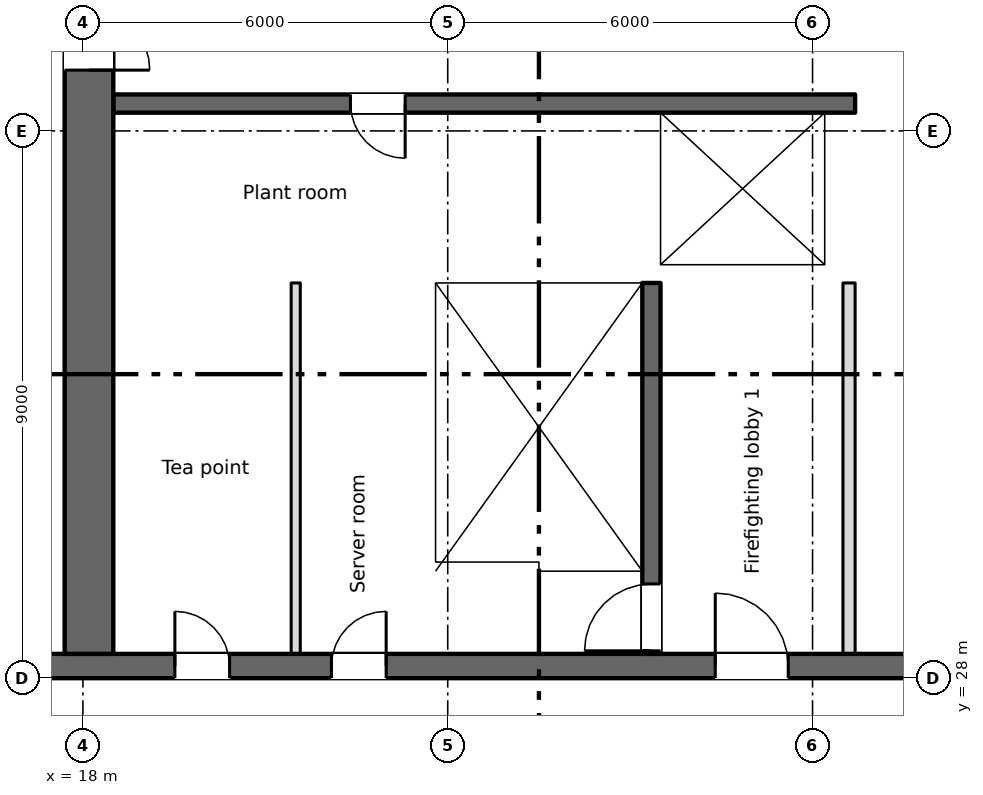
"""IFC4 building model, lengths in metres.
Left out: names, types, materials, properties, quantities, classifications, styles, units other than length and angle.
Written with IfcOpenShell. Run it as: python <this file> out.ifc"""

import sys

from ifc_helpers import new_model, si_unit, direction, frame, frame_2d, origin, place, context, subcontext, project, spatial, rectangle, extrude, element, fill, save


model = new_model("IFC4")
c1 = context("Model", 3, precision=1e-05, world=origin(), true_north=direction((0.0, 1.0)))
c2 = subcontext(c1, "Body", "Model", "MODEL_VIEW")
j1 = project(units=[si_unit("LENGTHUNIT", "METRE"), si_unit("PLANEANGLEUNIT", "RADIAN")], contexts=[c1])
p1 = place(None, origin())
s1 = spatial("IfcSite", under=j1, at=p1, CompositionType="ELEMENT")
p2 = place(p1, origin())
s2 = spatial("IfcBuilding", under=s1, at=p2, CompositionType="ELEMENT")
p3 = place(p2, frame((0.0, 0.0, 95.0)))
s3 = spatial("IfcBuildingStorey", under=s2, at=p3, CompositionType="ELEMENT", Elevation=95.0)
p4 = place(p3, frame((6.7, 28.2, 0.0), z_axis=(0.0, 0.0, 1.0), x_axis=(1.0, 0.0, 0.0)))
e1 = element("IfcWall", 1, at=p4, inside=s3, PredefinedType="SHEAR", context=c2, shape_type="SweptSolid", body=[
    extrude(rectangle(XDim=57.8, YDim=0.4, at=frame_2d((28.9, 0.0))), origin(), (0.0, 0.0, 1.0), 3.35),
])
p5 = place(p4, frame((12.812, 0.0, 0.0)))
e2 = element("IfcOpeningElement", 2, at=p5, cuts=e1, PredefinedType="OPENING", context=c2, shape_type="SweptSolid", body=[
    extrude(rectangle(XDim=0.9, YDim=2.1, at=frame_2d((0.45, 1.05))), frame((0.0, 0.21, 0.0), z_axis=(0.0, -1.0, 0.0), x_axis=(1.0, 0.0, 0.0)), (0.0, 0.0, 1.0), 0.42),
])
p6 = place(p4, frame((15.387, 0.0, 0.0)))
e3 = element("IfcOpeningElement", 3, at=p6, cuts=e1, PredefinedType="OPENING", context=c2, shape_type="SweptSolid", body=[
    extrude(rectangle(XDim=0.9, YDim=2.1, at=frame_2d((0.45, 1.05))), frame((0.0, 0.21, 0.0), z_axis=(0.0, -1.0, 0.0), x_axis=(1.0, 0.0, 0.0)), (0.0, 0.0, 1.0), 0.42),
])
p7 = place(p4, frame((48.312, 0.0, 0.0)))
e4 = element("IfcOpeningElement", 4, at=p7, cuts=e1, PredefinedType="OPENING", context=c2, shape_type="SweptSolid", body=[
    extrude(rectangle(XDim=0.9, YDim=2.1, at=frame_2d((0.45, 1.05))), frame((0.0, 0.21, 0.0), z_axis=(0.0, -1.0, 0.0), x_axis=(1.0, 0.0, 0.0)), (0.0, 0.0, 1.0), 0.42),
])
p8 = place(p4, frame((50.887, 0.0, 0.0)))
e5 = element("IfcOpeningElement", 5, at=p8, cuts=e1, PredefinedType="OPENING", context=c2, shape_type="SweptSolid", body=[
    extrude(rectangle(XDim=0.9, YDim=2.1, at=frame_2d((0.45, 1.05))), frame((0.0, 0.21, 0.0), z_axis=(0.0, -1.0, 0.0), x_axis=(1.0, 0.0, 0.0)), (0.0, 0.0, 1.0), 0.42),
])
p9 = place(p4, frame((0.562, 0.0, 0.0)))
e6 = element("IfcOpeningElement", 6, at=p9, cuts=e1, PredefinedType="OPENING", context=c2, shape_type="SweptSolid", body=[
    extrude(rectangle(XDim=0.9, YDim=2.1, at=frame_2d((0.45, 1.05))), frame((0.0, 0.21, 0.0), z_axis=(0.0, -1.0, 0.0), x_axis=(1.0, 0.0, 0.0)), (0.0, 0.0, 1.0), 0.42),
])
p10 = place(p4, frame((2.137, 0.0, 0.0)))
e7 = element("IfcOpeningElement", 7, at=p10, cuts=e1, PredefinedType="OPENING", context=c2, shape_type="SweptSolid", body=[
    extrude(rectangle(XDim=0.9, YDim=2.1, at=frame_2d((0.45, 1.05))), frame((0.0, 0.21, 0.0), z_axis=(0.0, -1.0, 0.0), x_axis=(1.0, 0.0, 0.0)), (0.0, 0.0, 1.0), 0.42),
])
p11 = place(p4, frame((4.7, 0.0, 0.0)))
e8 = element("IfcOpeningElement", 8, at=p11, cuts=e1, PredefinedType="OPENING", context=c2, shape_type="SweptSolid", body=[
    extrude(rectangle(XDim=1.2, YDim=2.1, at=frame_2d((0.6, 1.05))), frame((0.0, 0.21, 0.0), z_axis=(0.0, -1.0, 0.0), x_axis=(1.0, 0.0, 0.0)), (0.0, 0.0, 1.0), 0.42),
])
p12 = place(p4, frame((31.7, 0.0, 0.0)))
e9 = element("IfcOpeningElement", 9, at=p12, cuts=e1, PredefinedType="OPENING", context=c2, shape_type="SweptSolid", body=[
    extrude(rectangle(XDim=1.2, YDim=2.1, at=frame_2d((0.6, 1.05))), frame((0.0, 0.21, 0.0), z_axis=(0.0, -1.0, 0.0), x_axis=(1.0, 0.0, 0.0)), (0.0, 0.0, 1.0), 0.42),
])
p13 = place(p4, frame((55.2, 0.0, 0.0)))
e10 = element("IfcOpeningElement", 10, at=p13, cuts=e1, PredefinedType="OPENING", context=c2, shape_type="SweptSolid", body=[
    extrude(rectangle(XDim=1.2, YDim=2.1, at=frame_2d((0.6, 1.05))), frame((0.0, 0.21, 0.0), z_axis=(0.0, -1.0, 0.0), x_axis=(1.0, 0.0, 0.0)), (0.0, 0.0, 1.0), 0.42),
])
p14 = place(p4, frame((21.7, 0.0, 0.0)))
e11 = element("IfcOpeningElement", 11, at=p14, cuts=e1, PredefinedType="OPENING", context=c2, shape_type="SweptSolid", body=[
    extrude(rectangle(XDim=1.2, YDim=2.1, at=frame_2d((0.6, 1.05))), frame((0.0, 0.21, 0.0), z_axis=(0.0, -1.0, 0.0), x_axis=(1.0, 0.0, 0.0)), (0.0, 0.0, 1.0), 0.42),
])
p15 = place(p4, frame((41.7, 0.0, 0.0)))
e12 = element("IfcOpeningElement", 12, at=p15, cuts=e1, PredefinedType="OPENING", context=c2, shape_type="SweptSolid", body=[
    extrude(rectangle(XDim=1.2, YDim=2.1, at=frame_2d((0.6, 1.05))), frame((0.0, 0.21, 0.0), z_axis=(0.0, -1.0, 0.0), x_axis=(1.0, 0.0, 0.0)), (0.0, 0.0, 1.0), 0.42),
])
p16 = place(p4, frame((24.85, 0.0, 0.0)))
e13 = element("IfcOpeningElement", 13, at=p16, cuts=e1, PredefinedType="OPENING", context=c2, shape_type="SweptSolid", body=[
    extrude(rectangle(XDim=2.4, YDim=2.1, at=frame_2d((1.2, 1.05))), frame((0.0, 0.21, 0.0), z_axis=(0.0, -1.0, 0.0), x_axis=(1.0, 0.0, 0.0)), (0.0, 0.0, 1.0), 0.42),
])
p17 = place(p4, frame((37.35, 0.0, 0.0)))
e14 = element("IfcOpeningElement", 14, at=p17, cuts=e1, PredefinedType="OPENING", context=c2, shape_type="SweptSolid", body=[
    extrude(rectangle(XDim=2.4, YDim=2.1, at=frame_2d((1.2, 1.05))), frame((0.0, 0.21, 0.0), z_axis=(0.0, -1.0, 0.0), x_axis=(1.0, 0.0, 0.0)), (0.0, 0.0, 1.0), 0.42),
])
p18 = place(p4, frame((7.95, 0.0, 0.0)))
e15 = element("IfcOpeningElement", 15, at=p18, cuts=e1, PredefinedType="OPENING", context=c2, shape_type="SweptSolid", body=[
    extrude(rectangle(XDim=2.4, YDim=2.1, at=frame_2d((1.2, 1.05))), frame((0.0, 0.21, 0.0), z_axis=(0.0, -1.0, 0.0), x_axis=(1.0, 0.0, 0.0)), (0.0, 0.0, 1.0), 0.42),
])
p19 = place(p4, frame((28.85, 0.0, 0.0)))
e16 = element("IfcOpeningElement", 16, at=p19, cuts=e1, PredefinedType="OPENING", context=c2, shape_type="SweptSolid", body=[
    extrude(rectangle(XDim=0.9, YDim=2.1, at=frame_2d((0.45, 1.05))), frame((0.0, 0.21, 0.0), z_axis=(0.0, -1.0, 0.0), x_axis=(1.0, 0.0, 0.0)), (0.0, 0.0, 1.0), 0.42),
])
p20 = place(p4, frame((34.85, 0.0, 0.0)))
e17 = element("IfcOpeningElement", 17, at=p20, cuts=e1, PredefinedType="OPENING", context=c2, shape_type="SweptSolid", body=[
    extrude(rectangle(XDim=0.9, YDim=2.1, at=frame_2d((0.45, 1.05))), frame((0.0, 0.21, 0.0), z_axis=(0.0, -1.0, 0.0), x_axis=(1.0, 0.0, 0.0)), (0.0, 0.0, 1.0), 0.42),
])
p21 = place(p3, frame((18.1, 28.4, 0.0), z_axis=(0.0, 0.0, 1.0), x_axis=(0.0, 1.0, 0.0)))
e18 = element("IfcWall", 18, at=p21, inside=s3, PredefinedType="SHEAR", context=c2, shape_type="SweptSolid", body=[
    extrude(rectangle(XDim=16.8, YDim=0.8, at=frame_2d((8.4, 0.0))), origin(), (0.0, 0.0, 1.0), 3.35),
])
p22 = place(p21, frame((9.6, 0.0, 0.0)))
e19 = element("IfcOpeningElement", 19, at=p22, cuts=e18, PredefinedType="OPENING", context=c2, shape_type="SweptSolid", body=[
    extrude(rectangle(XDim=2.0, YDim=2.1, at=frame_2d((1.0, 1.05))), frame((0.0, 0.41, 0.0), z_axis=(0.0, -1.0, 0.0), x_axis=(1.0, 0.0, 0.0)), (0.0, 0.0, 1.0), 0.82),
])
p23 = place(p21, frame((15.35, 0.0, 0.0)))
e20 = element("IfcOpeningElement", 20, at=p23, cuts=e18, PredefinedType="OPENING", context=c2, shape_type="SweptSolid", body=[
    extrude(rectangle(XDim=1.2, YDim=2.1, at=frame_2d((0.6, 1.05))), frame((0.0, 0.41, 0.0), z_axis=(0.0, -1.0, 0.0), x_axis=(1.0, 0.0, 0.0)), (0.0, 0.0, 1.0), 0.82),
])
p24 = place(p3, frame((23.65, 28.4, 0.0), z_axis=(0.0, 0.0, 1.0), x_axis=(0.0, 1.0, 0.0)))
e21 = element("IfcWall", 21, at=p24, inside=s3, PredefinedType="SHEAR", context=c2, shape_type="SweptSolid", body=[
    extrude(rectangle(XDim=6.1, YDim=0.3, at=frame_2d((3.05, 0.0))), origin(), (0.0, 0.0, 1.0), 3.35),
])
p25 = place(p3, frame((27.35, 28.4, 0.0), z_axis=(0.0, 0.0, 1.0), x_axis=(0.0, 1.0, 0.0)))
e22 = element("IfcWall", 22, at=p25, inside=s3, PredefinedType="SHEAR", context=c2, shape_type="SweptSolid", body=[
    extrude(rectangle(XDim=6.1, YDim=0.3, at=frame_2d((3.05, 0.0))), origin(), (0.0, 0.0, 1.0), 3.35),
])
p26 = place(p25, frame((0.05, 0.0, 0.0)))
e23 = element("IfcOpeningElement", 23, at=p26, cuts=e22, PredefinedType="OPENING", context=c2, shape_type="SweptSolid", body=[
    extrude(rectangle(XDim=1.1, YDim=2.1, at=frame_2d((0.55, 1.05))), frame((0.0, 0.16, 0.0), z_axis=(0.0, -1.0, 0.0), x_axis=(1.0, 0.0, 0.0)), (0.0, 0.0, 1.0), 0.32),
])
p27 = place(p3, frame((18.5, 34.65, 0.0), z_axis=(0.0, 0.0, 1.0), x_axis=(1.0, 0.0, 0.0)))
e24 = element("IfcWall", 24, at=p27, inside=s3, PredefinedType="SHEAR", context=c2, shape_type="SweptSolid", body=[
    extrude(rectangle(XDim=12.2, YDim=0.3, at=frame_2d((6.1, 0.0))), origin(), (0.0, 0.0, 1.0), 3.35),
])
p28 = place(p27, frame((9.8, 0.0, 0.0)))
e25 = element("IfcOpeningElement", 25, at=p28, cuts=e24, PredefinedType="OPENING", context=c2, shape_type="SweptSolid", body=[
    extrude(rectangle(XDim=1.1, YDim=2.1, at=frame_2d((0.55, 1.05))), frame((0.0, 0.16, 0.0), z_axis=(0.0, -1.0, 0.0), x_axis=(1.0, 0.0, 0.0)), (0.0, 0.0, 1.0), 0.32),
])
p29 = place(p3, frame((30.7, 37.45, 0.0), z_axis=(0.0, 0.0, 1.0), x_axis=(-1.0, 0.0, 0.0)))
e26 = element("IfcWall", 26, at=p29, inside=s3, PredefinedType="SHEAR", context=c2, shape_type="SweptSolid", body=[
    extrude(rectangle(XDim=12.2, YDim=0.3, at=frame_2d((6.1, 0.0))), origin(), (0.0, 0.0, 1.0), 3.35),
])
p30 = place(p29, frame((7.4, 0.0, 0.0)))
e27 = element("IfcOpeningElement", 27, at=p30, cuts=e26, PredefinedType="OPENING", context=c2, shape_type="SweptSolid", body=[
    extrude(rectangle(XDim=0.9, YDim=2.1, at=frame_2d((0.45, 1.05))), frame((0.0, 0.16, 0.0), z_axis=(0.0, -1.0, 0.0), x_axis=(1.0, 0.0, 0.0)), (0.0, 0.0, 1.0), 0.32),
])
p31 = place(p3, frame((27.35, 34.8, 0.0), z_axis=(0.0, 0.0, 1.0), x_axis=(0.0, 1.0, 0.0)))
e28 = element("IfcWall", 28, at=p31, inside=s3, PredefinedType="SHEAR", context=c2, shape_type="SweptSolid", body=[
    extrude(rectangle(XDim=2.5, YDim=0.3, at=frame_2d((1.25, 0.0))), origin(), (0.0, 0.0, 1.0), 3.35),
])
p32 = place(p3, frame((30.45, 34.8, 0.0), z_axis=(0.0, 0.0, 1.0), x_axis=(0.0, 1.0, 0.0)))
e29 = element("IfcWall", 29, at=p32, inside=s3, PredefinedType="SHEAR", context=c2, shape_type="SweptSolid", body=[
    extrude(rectangle(XDim=2.5, YDim=0.5, at=frame_2d((1.25, 0.0))), origin(), (0.0, 0.0, 1.0), 3.35),
])
p33 = place(p3, frame((30.6, 28.4, 0.0), z_axis=(0.0, 0.0, 1.0), x_axis=(0.0, 1.0, 0.0)))
e30 = element("IfcWall", 30, at=p33, inside=s3, PredefinedType="PARTITIONING", context=c2, shape_type="SweptSolid", body=[
    extrude(rectangle(XDim=6.1, YDim=0.2, at=frame_2d((3.05, 0.0))), origin(), (0.0, 0.0, 1.0), 3.35),
])
p34 = place(p3, frame((21.5, 28.4, 0.0), z_axis=(0.0, 0.0, 1.0), x_axis=(0.0, 1.0, 0.0)))
e31 = element("IfcWall", 31, at=p34, inside=s3, PredefinedType="PARTITIONING", context=c2, shape_type="SweptSolid", body=[
    extrude(rectangle(XDim=6.1, YDim=0.15, at=frame_2d((3.05, 0.0))), origin(), (0.0, 0.0, 1.0), 3.35),
])
p35 = place(p5, origin())
e32 = element("IfcDoor", 32, at=p35, inside=s3, OperationType="SINGLE_SWING_LEFT", PredefinedType="DOOR", context=c2, shape_type="SweptSolid", body=[
    extrude(rectangle(XDim=0.9, YDim=2.1, at=frame_2d((0.45, 1.05))), frame((0.0, 0.025, 0.0), z_axis=(0.0, -1.0, 0.0), x_axis=(1.0, 0.0, 0.0)), (0.0, 0.0, 1.0), 0.05),
])
fill(e2, e32)
p36 = place(p6, origin())
e33 = element("IfcDoor", 33, at=p36, inside=s3, OperationType="SINGLE_SWING_RIGHT", PredefinedType="DOOR", context=c2, shape_type="SweptSolid", body=[
    extrude(rectangle(XDim=0.9, YDim=2.1, at=frame_2d((0.45, 1.05))), frame((0.0, 0.025, 0.0), z_axis=(0.0, -1.0, 0.0), x_axis=(1.0, 0.0, 0.0)), (0.0, 0.0, 1.0), 0.05),
])
fill(e3, e33)
p37 = place(p30, origin())
e34 = element("IfcDoor", 34, at=p37, inside=s3, OperationType="SINGLE_SWING_LEFT", PredefinedType="DOOR", context=c2, shape_type="SweptSolid", body=[
    extrude(rectangle(XDim=0.9, YDim=2.1, at=frame_2d((0.45, 1.05))), frame((0.0, 0.025, 0.0), z_axis=(0.0, -1.0, 0.0), x_axis=(1.0, 0.0, 0.0)), (0.0, 0.0, 1.0), 0.05),
])
fill(e27, e34)
p38 = place(p28, origin())
e35 = element("IfcDoor", 35, at=p38, inside=s3, OperationType="SLIDING_TO_LEFT", PredefinedType="DOOR", context=c2, shape_type="SweptSolid", body=[
    extrude(rectangle(XDim=1.1, YDim=2.1, at=frame_2d((0.55, 1.05))), frame((0.0, 0.025, 0.0), z_axis=(0.0, -1.0, 0.0), x_axis=(1.0, 0.0, 0.0)), (0.0, 0.0, 1.0), 0.05),
])
fill(e25, e35)
p39 = place(p26, origin())
e36 = element("IfcDoor", 36, at=p39, inside=s3, OperationType="SINGLE_SWING_LEFT", PredefinedType="DOOR", context=c2, shape_type="SweptSolid", body=[
    extrude(rectangle(XDim=1.1, YDim=2.1, at=frame_2d((0.55, 1.05))), frame((0.0, 0.025, 0.0), z_axis=(0.0, -1.0, 0.0), x_axis=(1.0, 0.0, 0.0)), (0.0, 0.0, 1.0), 0.05),
])
fill(e23, e36)
p40 = place(p14, origin())
e37 = element("IfcDoor", 37, at=p40, inside=s3, OperationType="SINGLE_SWING_LEFT", PredefinedType="DOOR", context=c2, shape_type="SweptSolid", body=[
    extrude(rectangle(XDim=1.2, YDim=2.1, at=frame_2d((0.6, 1.05))), frame((0.0, 0.025, 0.0), z_axis=(0.0, -1.0, 0.0), x_axis=(1.0, 0.0, 0.0)), (0.0, 0.0, 1.0), 0.05),
])
fill(e11, e37)
p41 = place(p22, origin())
e38 = element("IfcDoor", 38, at=p41, inside=s3, OperationType="DOUBLE_DOOR_SINGLE_SWING", PredefinedType="DOOR", context=c2, shape_type="SweptSolid", body=[
    extrude(rectangle(XDim=2.0, YDim=2.1, at=frame_2d((1.0, 1.05))), frame((0.0, 0.025, 0.0), z_axis=(0.0, -1.0, 0.0), x_axis=(1.0, 0.0, 0.0)), (0.0, 0.0, 1.0), 0.05),
])
fill(e19, e38)
save(model, sys.argv[1])
